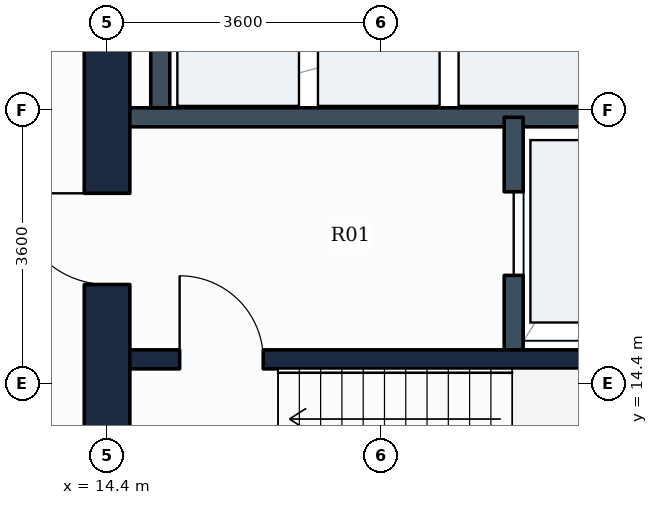
"""IFC4 building model, lengths in metres.
Left out: names, types, materials, properties, quantities, classifications, styles, units other than length and angle.
Written with IfcOpenShell. Run it as: python <this file> out.ifc"""

import sys

from ifc_helpers import new_model, si_unit, direction, frame, frame_2d, origin, place, context, subcontext, project, spatial, rectangle, extrude, element, fill, save


model = new_model("IFC4")
c1 = context("Model", 3, precision=1e-05, world=origin(), true_north=direction((0.0, 1.0)))
c2 = subcontext(c1, "Body", "Model", "MODEL_VIEW")
j1 = project(units=[si_unit("LENGTHUNIT", "METRE"), si_unit("PLANEANGLEUNIT", "RADIAN")], contexts=[c1])
p1 = place(None, origin())
s1 = spatial("IfcSite", under=j1, at=p1, CompositionType="ELEMENT")
p2 = place(p1, origin())
s2 = spatial("IfcBuilding", under=s1, at=p2, CompositionType="ELEMENT")
p3 = place(p2, frame((0.0, 0.0, 63.0)))
s3 = spatial("IfcBuildingStorey", under=s2, at=p3, CompositionType="ELEMENT", Elevation=63.0)
p4 = place(p3, frame((14.4, 10.8, 0.0), z_axis=(0.0, 0.0, 1.0), x_axis=(0.0, 1.0, 0.0)))
e1 = element("IfcWall", 1, at=p4, inside=s3, PredefinedType="SHEAR", context=c2, shape_type="SweptSolid", body=[
    extrude(rectangle(XDim=14.4, YDim=0.6, at=frame_2d((7.2, 0.0))), origin(), (0.0, 0.0, 1.0), 3.65),
])
p5 = place(p4, frame((11.05, 0.0, 0.0)))
e2 = element("IfcOpeningElement", 2, at=p5, cuts=e1, PredefinedType="OPENING", context=c2, shape_type="SweptSolid", body=[
    extrude(rectangle(XDim=1.1, YDim=2.1, at=frame_2d((0.55, 1.05))), frame((0.0, 0.31, 0.0), z_axis=(0.0, -1.0, 0.0), x_axis=(1.0, 0.0, 0.0)), (0.0, 0.0, 1.0), 0.62),
])
p6 = place(p4, frame((4.9, 0.0, 0.0)))
e3 = element("IfcOpeningElement", 3, at=p6, cuts=e1, PredefinedType="OPENING", context=c2, shape_type="SweptSolid", body=[
    extrude(rectangle(XDim=1.2, YDim=2.1, at=frame_2d((0.6, 1.05))), frame((0.0, 0.31, 0.0), z_axis=(0.0, -1.0, 0.0), x_axis=(1.0, 0.0, 0.0)), (0.0, 0.0, 1.0), 0.62),
])
p7 = place(p3, frame((14.7, 14.715, 0.0), z_axis=(0.0, 0.0, 1.0), x_axis=(1.0, 0.0, 0.0)))
e4 = element("IfcWall", 4, at=p7, inside=s3, PredefinedType="SHEAR", context=c2, shape_type="SweptSolid", body=[
    extrude(rectangle(XDim=8.65, YDim=0.25, at=frame_2d((4.325, 0.0))), origin(), (0.0, 0.0, 1.0), 3.65),
])
p8 = place(p7, frame((0.655, 0.0, 0.0)))
e5 = element("IfcOpeningElement", 5, at=p8, cuts=e4, PredefinedType="OPENING", context=c2, shape_type="SweptSolid", body=[
    extrude(rectangle(XDim=1.1, YDim=2.1, at=frame_2d((0.55, 1.05))), frame((0.0, 0.135, 0.0), z_axis=(0.0, -1.0, 0.0), x_axis=(1.0, 0.0, 0.0)), (0.0, 0.0, 1.0), 0.27),
])
p9 = place(p3, frame((14.65, 17.9, 0.0), z_axis=(0.0, 0.0, 1.0), x_axis=(1.0, 0.0, 0.0)))
e6 = element("IfcWall", 6, at=p9, inside=s3, PredefinedType="PARTITIONING", context=c2, shape_type="SweptSolid", body=[
    extrude(rectangle(XDim=7.15, YDim=0.25, at=frame_2d((3.575, 0.0))), origin(), (0.0, 0.0, 1.0), 3.635),
])
p10 = place(p3, frame((19.75, 14.84, 0.0), z_axis=(0.0, 0.0, 1.0), x_axis=(0.0, 1.0, 0.0)))
e7 = element("IfcWall", 7, at=p10, inside=s3, PredefinedType="PARTITIONING", context=c2, shape_type="SweptSolid", body=[
    extrude(rectangle(XDim=3.06, YDim=0.25, at=frame_2d((1.53, 0.0))), origin(), (0.0, 0.0, 1.0), 3.635),
])
p11 = place(p10, frame((0.98, 0.0, 0.0)))
e8 = element("IfcOpeningElement", 8, at=p11, cuts=e7, PredefinedType="OPENING", context=c2, shape_type="SweptSolid", body=[
    extrude(rectangle(XDim=1.1, YDim=2.1, at=frame_2d((0.55, 1.05))), frame((0.0, 0.135, 0.0), z_axis=(0.0, -1.0, 0.0), x_axis=(1.0, 0.0, 0.0)), (0.0, 0.0, 1.0), 0.27),
])
p12 = place(p3, frame((15.1, 18.025, 0.0), z_axis=(0.0, 0.0, 1.0), x_axis=(0.0, 1.0, 0.0)))
e9 = element("IfcWall", 9, at=p12, inside=s3, PredefinedType="PARTITIONING", context=c2, shape_type="SweptSolid", body=[
    extrude(rectangle(XDim=1.975, YDim=0.25, at=frame_2d((0.988, 0.0))), origin(), (0.0, 0.0, 1.0), 3.635),
])
p13 = place(p8, origin())
e10 = element("IfcDoor", 10, at=p13, inside=s3, OperationType="SINGLE_SWING_LEFT", PredefinedType="DOOR", context=c2, shape_type="SweptSolid", body=[
    extrude(rectangle(XDim=1.1, YDim=2.1, at=frame_2d((0.55, 1.05))), frame((0.0, 0.025, 0.0), z_axis=(0.0, -1.0, 0.0), x_axis=(1.0, 0.0, 0.0)), (0.0, 0.0, 1.0), 0.05),
])
fill(e5, e10)
p14 = place(p11, origin())
e11 = element("IfcDoor", 11, at=p14, inside=s3, OperationType="SLIDING_TO_LEFT", PredefinedType="DOOR", context=c2, shape_type="SweptSolid", body=[
    extrude(rectangle(XDim=1.1, YDim=2.1, at=frame_2d((0.55, 1.05))), frame((0.0, 0.025, 0.0), z_axis=(0.0, -1.0, 0.0), x_axis=(1.0, 0.0, 0.0)), (0.0, 0.0, 1.0), 0.05),
])
fill(e8, e11)
p15 = place(p6, origin())
e12 = element("IfcDoor", 12, at=p15, inside=s3, OperationType="SINGLE_SWING_RIGHT", PredefinedType="DOOR", context=c2, shape_type="SweptSolid", body=[
    extrude(rectangle(XDim=1.2, YDim=2.1, at=frame_2d((0.6, 1.05))), frame((0.0, 0.025, 0.0), z_axis=(0.0, -1.0, 0.0), x_axis=(1.0, 0.0, 0.0)), (0.0, 0.0, 1.0), 0.05),
])
fill(e3, e12)
save(model, sys.argv[1])
